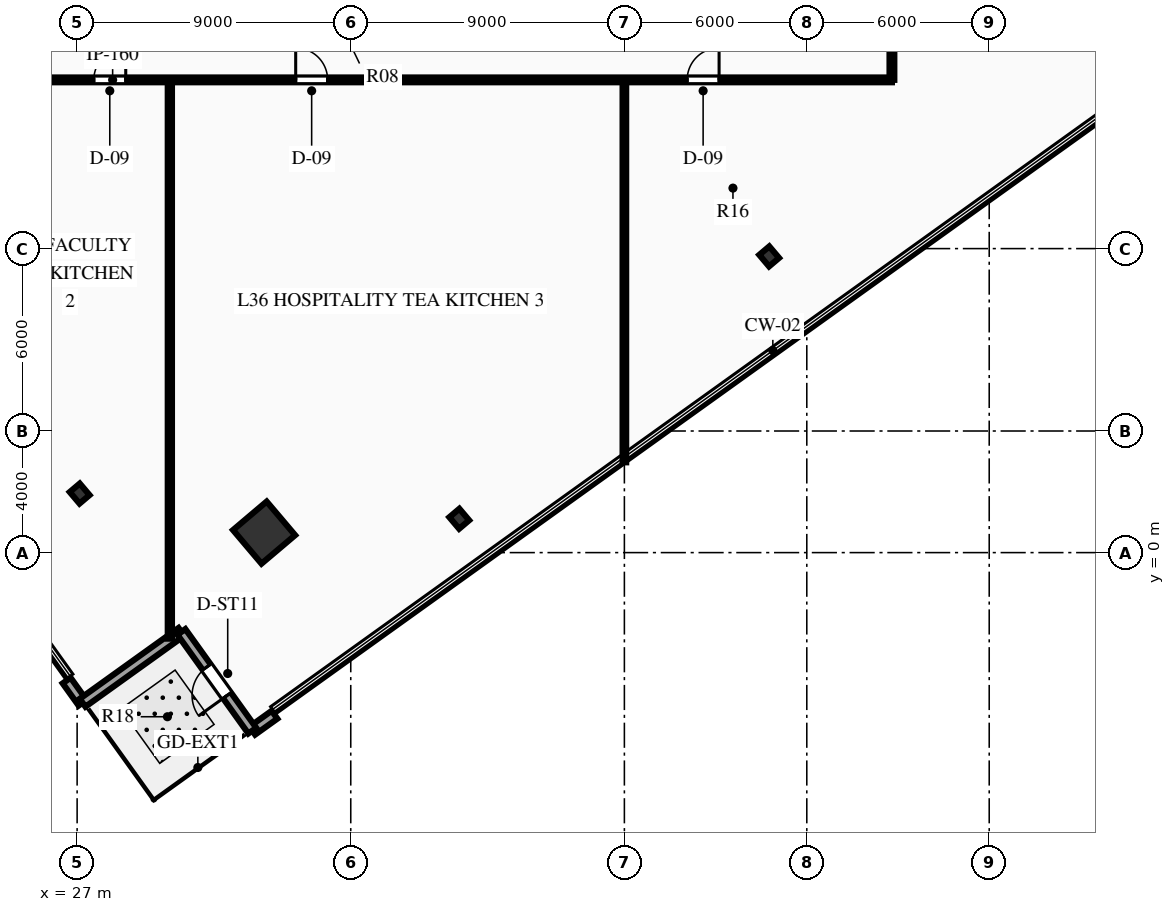
"""IFC4 building model, lengths in metres.
Left out: names, types, materials, properties, quantities, classifications, styles, units other than length and angle.
Written with IfcOpenShell. Run it as: python <this file> out.ifc"""

import sys

from ifc_helpers import new_model, si_unit, direction, frame, frame_2d, origin, origin_2d, place, context, subcontext, project, spatial, rectangle, hollow_rectangle, i_section, extrude, element, fill, save


model = new_model("IFC4")
c1 = context("Model", 3, precision=1e-05, world=origin(), true_north=direction((0.0, 1.0)))
c2 = subcontext(c1, "Body", "Model", "MODEL_VIEW")
j1 = project(units=[si_unit("LENGTHUNIT", "METRE"), si_unit("PLANEANGLEUNIT", "RADIAN")], contexts=[c1])
p1 = place(None, origin())
s1 = spatial("IfcSite", under=j1, at=p1, CompositionType="ELEMENT")
p2 = place(p1, origin())
s2 = spatial("IfcBuilding", under=s1, at=p2, CompositionType="ELEMENT")
p3 = place(p2, frame((0.0, 0.0, 148.2)))
s3 = spatial("IfcBuildingStorey", under=s2, at=p3, CompositionType="ELEMENT", Elevation=148.2)
p4 = place(p3, frame((33.149, 0.658, 0.0), z_axis=(0.0, 0.0, 1.0), x_axis=(0.763232469783, 0.646123979643, 0.0)))
e1 = element("IfcColumn", 1, at=p4, inside=s3, PredefinedType="COLUMN", context=c2, shape_type="SweptSolid", body=[
    extrude(hollow_rectangle(XDim=1.45, YDim=1.45, WallThickness=0.07, at=origin_2d()), origin(), (0.0, 0.0, 1.0), 3.75),
])
for number, where, z_axis, x_axis in (
    (2, (39.569, 1.114, 0.0), (0.0, 0.0, 1.0), (0.763, 0.646, 0.0)),
    (3, (49.762, 9.743, 0.0), (0.0, 0.0, 1.0), (0.763, 0.646, 0.0)),
    (4, (27.083, 1.942, 0.0), (0.0, 0.0, 1.0), (0.763, 0.646, 0.0)),
):
    element("IfcColumn", number, at=place(p3, frame(where, z_axis=z_axis, x_axis=x_axis)), inside=s3, PredefinedType="COLUMN", context=c2, shape_type="SweptSolid", body=[
        extrude(i_section(OverallWidth=0.432, OverallDepth=0.498, WebThickness=0.056, FlangeThickness=0.089, at=origin_2d()), origin(), (0.0, 0.0, 1.0), 3.75),
    ])
for number, where, z_axis, x_axis in (
    (5, (33.492, -5.334, 0.0), (0.0, 0.0, 1.0), (-0.812, -0.583, 0.0)),
    (6, (27.179, -4.939, 0.0), (0.0, 0.0, 1.0), (-0.583, 0.813, 0.0)),
):
    element("IfcWall", number, at=place(p3, frame(where, z_axis=z_axis, x_axis=x_axis)), inside=s3, PredefinedType="STANDARD", context=c2, shape_type="SweptSolid", body=[
        extrude(rectangle(XDim=0.9, YDim=0.32, at=frame_2d((0.45, 0.0))), origin(), (0.0, 0.0, 1.0), 3.46),
    ])
p5 = place(p3, frame((30.43, -2.608, 0.0), z_axis=(0.0, 0.0, 1.0), x_axis=(-0.812606115645, -0.582813264105, 0.0)))
e7 = element("IfcWall", 7, at=p5, inside=s3, PredefinedType="STANDARD", context=c2, shape_type="SweptSolid", body=[
    extrude(rectangle(XDim=4.0, YDim=0.32, at=frame_2d((2.0, 0.0))), origin(), (0.0, 0.0, 1.0), 3.46),
])
p6 = place(p3, frame((32.761, -5.858, 0.0), z_axis=(0.0, 0.0, 1.0), x_axis=(-0.582813264105, 0.812606115645, 0.0)))
e8 = element("IfcWall", 8, at=p6, inside=s3, PredefinedType="STANDARD", context=c2, shape_type="SweptSolid", body=[
    extrude(rectangle(XDim=4.0, YDim=0.32, at=frame_2d((2.0, 0.0))), origin(), (0.0, 0.0, 1.0), 3.46),
])
p7 = place(p6, frame((1.425, 0.0, 0.0)))
e9 = element("IfcOpeningElement", 9, at=p7, cuts=e8, PredefinedType="OPENING", context=c2, shape_type="SweptSolid", body=[
    extrude(rectangle(XDim=1.15, YDim=2.2, at=frame_2d((0.575, 1.1))), frame((0.0, 0.17, 0.0), z_axis=(0.0, -1.0, 0.0), x_axis=(1.0, 0.0, 0.0)), (0.0, 0.0, 1.0), 0.34),
])
p8 = place(p3, frame((18.2, 15.55, 0.0), z_axis=(0.0, 0.0, 1.0), x_axis=(1.0, 0.0, 0.0)))
e10 = element("IfcWall", 10, at=p8, inside=s3, PredefinedType="PARTITIONING", context=c2, shape_type="SweptSolid", body=[
    extrude(rectangle(XDim=35.6, YDim=0.16, at=frame_2d((17.8, 0.0))), origin(), (0.0, 0.0, 1.0), 3.46),
])
p9 = place(p8, frame((3.305, 0.0, 0.0)))
e11 = element("IfcOpeningElement", 11, at=p9, cuts=e10, PredefinedType="OPENING", context=c2, shape_type="SweptSolid", body=[
    extrude(rectangle(XDim=1.05, YDim=2.15, at=frame_2d((0.525, 1.075))), frame((0.0, 0.09, 0.0), z_axis=(0.0, -1.0, 0.0), x_axis=(1.0, 0.0, 0.0)), (0.0, 0.0, 1.0), 0.18),
])
p10 = place(p8, frame((9.349, 0.0, 0.0)))
e12 = element("IfcOpeningElement", 12, at=p10, cuts=e10, PredefinedType="OPENING", context=c2, shape_type="SweptSolid", body=[
    extrude(rectangle(XDim=1.05, YDim=2.15, at=frame_2d((0.525, 1.075))), frame((0.0, 0.09, 0.0), z_axis=(0.0, -1.0, 0.0), x_axis=(1.0, 0.0, 0.0)), (0.0, 0.0, 1.0), 0.18),
])
p11 = place(p8, frame((15.989, 0.0, 0.0)))
e13 = element("IfcOpeningElement", 13, at=p11, cuts=e10, PredefinedType="OPENING", context=c2, shape_type="SweptSolid", body=[
    extrude(rectangle(XDim=1.05, YDim=2.15, at=frame_2d((0.525, 1.075))), frame((0.0, 0.09, 0.0), z_axis=(0.0, -1.0, 0.0), x_axis=(1.0, 0.0, 0.0)), (0.0, 0.0, 1.0), 0.18),
])
p12 = place(p8, frame((28.865, 0.0, 0.0)))
e14 = element("IfcOpeningElement", 14, at=p12, cuts=e10, PredefinedType="OPENING", context=c2, shape_type="SweptSolid", body=[
    extrude(rectangle(XDim=1.05, YDim=2.15, at=frame_2d((0.525, 1.075))), frame((0.0, 0.09, 0.0), z_axis=(0.0, -1.0, 0.0), x_axis=(1.0, 0.0, 0.0)), (0.0, 0.0, 1.0), 0.18),
])
p13 = place(p3, frame((53.8, 15.55, 0.0), z_axis=(0.0, 0.0, 1.0), x_axis=(0.0, 1.0, 0.0)))
e15 = element("IfcWall", 15, at=p13, inside=s3, PredefinedType="PARTITIONING", context=c2, shape_type="SweptSolid", body=[
    extrude(rectangle(XDim=2.3, YDim=0.16, at=frame_2d((1.15, 0.0))), origin(), (0.0, 0.0, 1.0), 3.46),
])
p14 = place(p3, frame((30.05, -2.831, 0.0), z_axis=(0.0, 0.0, 1.0), x_axis=(0.0, 1.0, 0.0)))
e16 = element("IfcWall", 16, at=p14, inside=s3, PredefinedType="PARTITIONING", context=c2, shape_type="SweptSolid", body=[
    extrude(rectangle(XDim=18.381, YDim=0.14, at=frame_2d((9.19, 0.0))), origin(), (0.0, 0.0, 1.0), 3.46),
])
p15 = place(p3, frame((45.0, 2.969, 0.0), z_axis=(0.0, 0.0, 1.0), x_axis=(0.0, 1.0, 0.0)))
e17 = element("IfcWall", 17, at=p15, inside=s3, PredefinedType="PARTITIONING", context=c2, shape_type="SweptSolid", body=[
    extrude(rectangle(XDim=12.581, YDim=0.12, at=frame_2d((6.29, 0.0))), origin(), (0.0, 0.0, 1.0), 3.46),
])
p16 = place(p7, origin())
e18 = element("IfcDoor", 18, at=p16, inside=s3, OperationType="SINGLE_SWING_LEFT", PredefinedType="DOOR", context=c2, shape_type="SweptSolid", body=[
    extrude(rectangle(XDim=1.15, YDim=2.2, at=frame_2d((0.575, 1.1))), frame((0.0, 0.025, 0.0), z_axis=(0.0, -1.0, 0.0), x_axis=(1.0, 0.0, 0.0)), (0.0, 0.0, 1.0), 0.05),
])
fill(e9, e18)
p17 = place(p10, origin())
e19 = element("IfcDoor", 19, at=p17, inside=s3, OperationType="SINGLE_SWING_RIGHT", PredefinedType="DOOR", context=c2, shape_type="SweptSolid", body=[
    extrude(rectangle(XDim=1.05, YDim=2.15, at=frame_2d((0.525, 1.075))), frame((0.0, 0.025, 0.0), z_axis=(0.0, -1.0, 0.0), x_axis=(1.0, 0.0, 0.0)), (0.0, 0.0, 1.0), 0.05),
])
fill(e12, e19)
p18 = place(p11, origin())
e20 = element("IfcDoor", 20, at=p18, inside=s3, OperationType="SINGLE_SWING_LEFT", PredefinedType="DOOR", context=c2, shape_type="SweptSolid", body=[
    extrude(rectangle(XDim=1.05, YDim=2.15, at=frame_2d((0.525, 1.075))), frame((0.0, 0.025, 0.0), z_axis=(0.0, -1.0, 0.0), x_axis=(1.0, 0.0, 0.0)), (0.0, 0.0, 1.0), 0.05),
])
fill(e13, e20)
p19 = place(p12, origin())
e21 = element("IfcDoor", 21, at=p19, inside=s3, OperationType="SINGLE_SWING_RIGHT", PredefinedType="DOOR", context=c2, shape_type="SweptSolid", body=[
    extrude(rectangle(XDim=1.05, YDim=2.15, at=frame_2d((0.525, 1.075))), frame((0.0, 0.025, 0.0), z_axis=(0.0, -1.0, 0.0), x_axis=(1.0, 0.0, 0.0)), (0.0, 0.0, 1.0), 0.05),
])
fill(e14, e21)
save(model, sys.argv[1])
